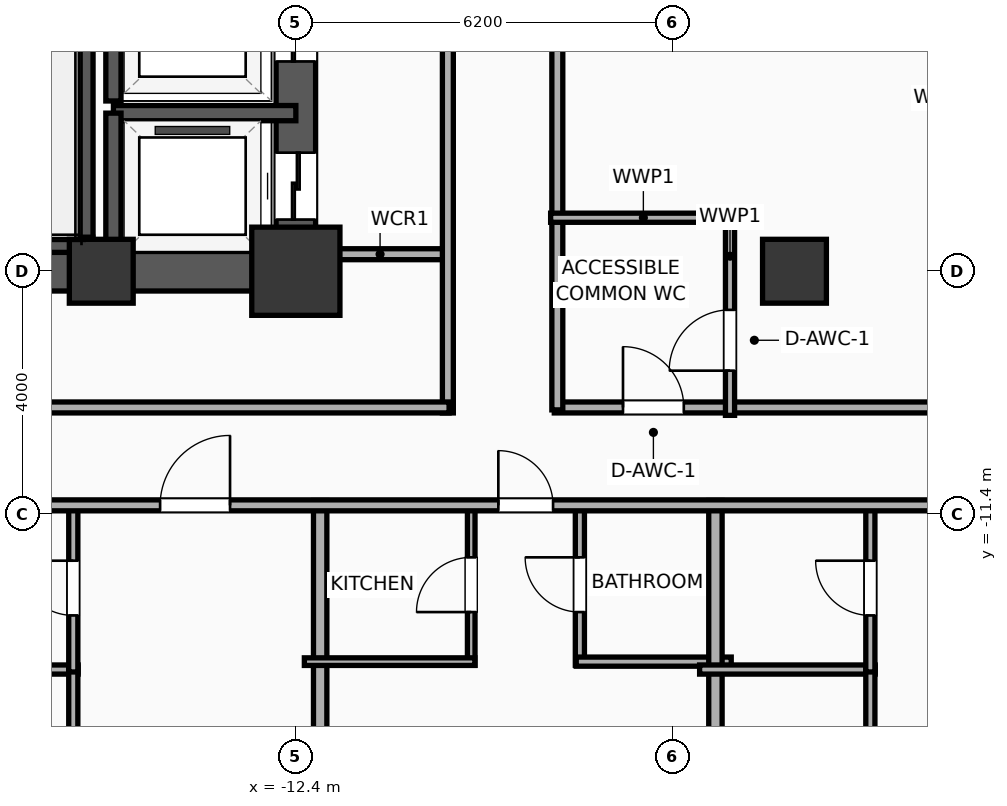
"""IFC4 building model, lengths in metres.
Left out: names, types, materials, properties, quantities, classifications, styles, units other than length and angle.
Written with IfcOpenShell. Run it as: python <this file> out.ifc"""

import sys

from ifc_helpers import new_model, si_unit, direction, frame, frame_2d, origin, origin_2d, place, context, subcontext, project, spatial, rectangle, extrude, element, fill, save


model = new_model("IFC4")
c1 = context("Model", 3, precision=1e-05, world=origin(), true_north=direction((0.0, 1.0)))
c2 = subcontext(c1, "Body", "Model", "MODEL_VIEW")
j1 = project(units=[si_unit("LENGTHUNIT", "METRE"), si_unit("PLANEANGLEUNIT", "RADIAN")], contexts=[c1])
p1 = place(None, origin())
s1 = spatial("IfcSite", under=j1, at=p1, CompositionType="ELEMENT")
p2 = place(p1, origin())
s2 = spatial("IfcBuilding", under=s1, at=p2, CompositionType="ELEMENT")
p3 = place(p2, frame((0.0, 0.0, 76.7)))
s3 = spatial("IfcBuildingStorey", under=s2, at=p3, CompositionType="ELEMENT", Elevation=76.7)
p4 = place(p3, frame((-15.6, -7.4, 0.0), z_axis=(0.0, 0.0, 1.0), x_axis=(1.0, 0.0, 0.0)))
e1 = element("IfcColumn", 1, at=p4, inside=s3, PredefinedType="COLUMN", context=c2, shape_type="SweptSolid", body=[
    extrude(rectangle(XDim=1.05, YDim=1.05, at=origin_2d()), origin(), (0.0, 0.0, 1.0), 3.9),
])
p5 = place(p3, frame((-12.4, -7.4, 0.0), z_axis=(0.0, 0.0, 1.0), x_axis=(1.0, 0.0, 0.0)))
e2 = element("IfcColumn", 2, at=p5, inside=s3, PredefinedType="COLUMN", context=c2, shape_type="SweptSolid", body=[
    extrude(rectangle(XDim=1.45, YDim=1.45, at=origin_2d()), origin(), (0.0, 0.0, 1.0), 3.9),
])
p6 = place(p3, frame((-19.525, -7.4, 0.0), z_axis=(0.0, 0.0, 1.0), x_axis=(1.0, 0.0, 0.0)))
e3 = element("IfcWall", 3, at=p6, inside=s3, PredefinedType="SHEAR", context=c2, shape_type="SweptSolid", body=[
    extrude(rectangle(XDim=7.45, YDim=0.65, at=frame_2d((3.725, 0.0))), origin(), (0.0, 0.0, 1.0), 3.6),
])
p7 = place(p3, frame((-12.4, -7.4, 0.0), z_axis=(0.0, 0.0, 1.0), x_axis=(0.0, 1.0, 0.0)))
e4 = element("IfcWall", 4, at=p7, inside=s3, PredefinedType="SHEAR", context=c2, shape_type="SweptSolid", body=[
    extrude(rectangle(XDim=14.8, YDim=0.65, at=frame_2d((7.4, 0.0))), origin(), (0.0, 0.0, 1.0), 3.6),
])
p8 = place(p7, frame((0.85, 0.0, 0.0)))
e5 = element("IfcOpeningElement", 5, at=p8, cuts=e4, PredefinedType="OPENING", context=c2, shape_type="SweptSolid", body=[
    extrude(rectangle(XDim=1.1, YDim=2.05, at=frame_2d((0.55, 1.025))), frame((0.0, 0.335, 0.0), z_axis=(0.0, -1.0, 0.0), x_axis=(1.0, 0.0, 0.0)), (0.0, 0.0, 1.0), 0.67),
])
p9 = place(p7, frame((3.45, 0.0, 0.0)))
e6 = element("IfcOpeningElement", 6, at=p9, cuts=e4, PredefinedType="OPENING", context=c2, shape_type="SweptSolid", body=[
    extrude(rectangle(XDim=1.1, YDim=2.05, at=frame_2d((0.55, 1.025))), frame((0.0, 0.335, 0.0), z_axis=(0.0, -1.0, 0.0), x_axis=(1.0, 0.0, 0.0)), (0.0, 0.0, 1.0), 0.67),
])
p10 = place(p7, frame((10.53, 0.0, 0.0)))
e7 = element("IfcOpeningElement", 7, at=p10, cuts=e4, PredefinedType="OPENING", context=c2, shape_type="SweptSolid", body=[
    extrude(rectangle(XDim=1.1, YDim=2.05, at=frame_2d((0.55, 1.025))), frame((0.0, 0.335, 0.0), z_axis=(0.0, -1.0, 0.0), x_axis=(1.0, 0.0, 0.0)), (0.0, 0.0, 1.0), 0.67),
])
p11 = place(p3, frame((-15.86, -7.085, 0.0), z_axis=(0.0, 0.0, 1.0), x_axis=(0.0, 1.0, 0.0)))
e8 = element("IfcWall", 8, at=p11, inside=s3, PredefinedType="SOLIDWALL", context=c2, shape_type="SweptSolid", body=[
    extrude(rectangle(XDim=7.685, YDim=0.25, at=frame_2d((3.843, 0.0))), origin(), (0.0, 0.0, 1.0), 3.6),
])
p12 = place(p3, frame((-19.2, -6.965, 0.0), z_axis=(0.0, 0.0, 1.0), x_axis=(1.0, 0.0, 0.0)))
e9 = element("IfcWall", 9, at=p12, inside=s3, PredefinedType="SOLIDWALL", context=c2, shape_type="SweptSolid", body=[
    extrude(rectangle(XDim=3.46, YDim=0.25, at=frame_2d((1.73, 0.0))), origin(), (0.0, 0.0, 1.0), 3.6),
])
p13 = place(p3, frame((-4.2, -7.4, 0.0), z_axis=(0.0, 0.0, 1.0), x_axis=(1.0, 0.0, 0.0)))
e10 = element("IfcColumn", 10, at=p13, inside=s3, PredefinedType="COLUMN", context=c2, shape_type="SweptSolid", body=[
    extrude(rectangle(XDim=1.05, YDim=1.05, at=origin_2d()), origin(), (0.0, 0.0, 1.0), 3.9),
])
p14 = place(p3, frame((-12.4, -4.8, 0.0), z_axis=(0.0, 0.0, 1.0), x_axis=(-1.0, 0.0, 0.0)))
e11 = element("IfcWall", 11, at=p14, inside=s3, PredefinedType="SOLIDWALL", context=c2, shape_type="SweptSolid", body=[
    extrude(rectangle(XDim=3.0, YDim=0.25, at=frame_2d((1.5, 0.0))), origin(), (0.0, 0.0, 1.0), 3.6),
])
p15 = place(p3, frame((-15.4, -4.8, 0.0), z_axis=(0.0, 0.0, 1.0), x_axis=(0.0, -1.0, 0.0)))
e12 = element("IfcWall", 12, at=p15, inside=s3, PredefinedType="SOLIDWALL", context=c2, shape_type="SweptSolid", body=[
    extrude(rectangle(XDim=2.6, YDim=0.25, at=frame_2d((1.3, 0.0))), origin(), (0.0, 0.0, 1.0), 3.6),
])
p16 = place(p3, frame((-15.4, -2.2, 0.0), z_axis=(0.0, 0.0, 1.0), x_axis=(0.0, -1.0, 0.0)))
e13 = element("IfcWall", 13, at=p16, inside=s3, PredefinedType="SOLIDWALL", context=c2, shape_type="SweptSolid", body=[
    extrude(rectangle(XDim=2.4, YDim=0.25, at=frame_2d((1.2, 0.0))), origin(), (0.0, 0.0, 1.0), 3.6),
])
p17 = place(p3, frame((-12.15, -7.12, 0.0), z_axis=(0.0, 0.0, 1.0), x_axis=(1.0, 0.0, 0.0)))
e14 = element("IfcWall", 14, at=p17, inside=s3, PredefinedType="PARTITIONING", context=c2, shape_type="SweptSolid", body=[
    extrude(rectangle(XDim=2.27, YDim=0.18, at=frame_2d((1.135, 0.0))), origin(), (0.0, 0.0, 1.0), 2.89),
])
p18 = place(p3, frame((-9.9, -9.73, 0.0), z_axis=(0.0, 0.0, 1.0), x_axis=(0.0, 1.0, 0.0)))
e15 = element("IfcWall", 15, at=p18, inside=s3, PredefinedType="PARTITIONING", context=c2, shape_type="SweptSolid", body=[
    extrude(rectangle(XDim=19.46, YDim=0.18, at=frame_2d((9.73, 0.0))), origin(), (0.0, 0.0, 1.0), 3.6),
])
p19 = place(p18, frame((8.207, 0.0, 0.0)))
e16 = element("IfcOpeningElement", 16, at=p19, cuts=e15, PredefinedType="OPENING", context=c2, shape_type="SweptSolid", body=[
    extrude(rectangle(XDim=1.1, YDim=2.05, at=frame_2d((0.55, 1.025))), frame((0.0, 0.1, 0.0), z_axis=(0.0, -1.0, 0.0), x_axis=(1.0, 0.0, 0.0)), (0.0, 0.0, 1.0), 0.2),
])
p20 = place(p3, frame((-33.41, -9.64, 0.0), z_axis=(0.0, 0.0, 1.0), x_axis=(1.0, 0.0, 0.0)))
e17 = element("IfcWall", 17, at=p20, inside=s3, PredefinedType="PARTITIONING", context=c2, shape_type="SweptSolid", body=[
    extrude(rectangle(XDim=23.53, YDim=0.18, at=frame_2d((11.765, 0.0))), origin(), (0.0, 0.0, 1.0), 3.6),
])
p21 = place(p3, frame((-8.15, -9.64, 0.0), z_axis=(0.0, 0.0, 1.0), x_axis=(1.0, 0.0, 0.0)))
e18 = element("IfcWall", 18, at=p21, inside=s3, PredefinedType="PARTITIONING", context=c2, shape_type="SweptSolid", body=[
    extrude(rectangle(XDim=16.3, YDim=0.18, at=frame_2d((8.15, 0.0))), origin(), (0.0, 0.0, 1.0), 3.6),
])
p22 = place(p21, frame((1.13, 0.0, 0.0)))
e19 = element("IfcOpeningElement", 19, at=p22, cuts=e18, PredefinedType="OPENING", context=c2, shape_type="SweptSolid", body=[
    extrude(rectangle(XDim=1.0, YDim=2.05, at=frame_2d((0.5, 1.025))), frame((0.0, 0.1, 0.0), z_axis=(0.0, -1.0, 0.0), x_axis=(1.0, 0.0, 0.0)), (0.0, 0.0, 1.0), 0.2),
])
p23 = place(p21, frame((10.12, 0.0, 0.0)))
e20 = element("IfcOpeningElement", 20, at=p23, cuts=e18, PredefinedType="OPENING", context=c2, shape_type="SweptSolid", body=[
    extrude(rectangle(XDim=0.95, YDim=2.05, at=frame_2d((0.475, 1.025))), frame((0.0, 0.1, 0.0), z_axis=(0.0, -1.0, 0.0), x_axis=(1.0, 0.0, 0.0)), (0.0, 0.0, 1.0), 0.2),
])
p24 = place(p3, frame((-8.1, -9.68, 0.0), z_axis=(0.0, 0.0, 1.0), x_axis=(0.0, 1.0, 0.0)))
e21 = element("IfcWall", 21, at=p24, inside=s3, PredefinedType="PARTITIONING", context=c2, shape_type="SweptSolid", body=[
    extrude(rectangle(XDim=19.36, YDim=0.18, at=frame_2d((9.68, 0.0))), origin(), (0.0, 0.0, 1.0), 3.6),
])
p25 = place(p3, frame((-5.26, -9.77, 0.0), z_axis=(0.0, 0.0, 1.0), x_axis=(0.0, 1.0, 0.0)))
e22 = element("IfcWall", 22, at=p25, inside=s3, PredefinedType="PLUMBINGWALL", context=c2, shape_type="SweptSolid", body=[
    extrude(rectangle(XDim=3.35, YDim=0.15, at=frame_2d((1.675, 0.0))), origin(), (0.0, 0.0, 1.0), 3.6),
])
p26 = place(p25, frame((0.735, 0.0, 0.0)))
e23 = element("IfcOpeningElement", 23, at=p26, cuts=e22, PredefinedType="OPENING", context=c2, shape_type="SweptSolid", body=[
    extrude(rectangle(XDim=1.0, YDim=2.05, at=frame_2d((0.5, 1.025))), frame((0.0, 0.085, 0.0), z_axis=(0.0, -1.0, 0.0), x_axis=(1.0, 0.0, 0.0)), (0.0, 0.0, 1.0), 0.17),
])
p27 = place(p3, frame((-8.21, -6.52, 0.0), z_axis=(0.0, 0.0, 1.0), x_axis=(1.0, 0.0, 0.0)))
e24 = element("IfcWall", 24, at=p27, inside=s3, PredefinedType="PLUMBINGWALL", context=c2, shape_type="SweptSolid", body=[
    extrude(rectangle(XDim=3.05, YDim=0.15, at=frame_2d((1.525, 0.0))), origin(), (0.0, 0.0, 1.0), 3.6),
])
p28 = place(p3, frame((-18.76, -13.95, 0.0), z_axis=(0.0, 0.0, 1.0), x_axis=(1.0, 0.0, 0.0)))
e25 = element("IfcWall", 25, at=p28, inside=s3, PredefinedType="PLUMBINGWALL", context=c2, shape_type="SweptSolid", body=[
    extrude(rectangle(XDim=2.78, YDim=0.15, at=frame_2d((1.39, 0.0))), origin(), (0.0, 0.0, 1.0), 3.6),
])
p29 = place(p3, frame((-16.06, -22.258, 0.0), z_axis=(0.0, 0.0, 1.0), x_axis=(0.0, 1.0, 0.0)))
e26 = element("IfcWall", 26, at=p29, inside=s3, PredefinedType="PLUMBINGWALL", context=c2, shape_type="SweptSolid", body=[
    extrude(rectangle(XDim=8.348, YDim=0.15, at=frame_2d((4.174, 0.0))), origin(), (0.0, 0.0, 1.0), 3.6),
])
p30 = place(p29, frame((6.395, 0.0, 0.0)))
e27 = element("IfcOpeningElement", 27, at=p30, cuts=e26, PredefinedType="OPENING", context=c2, shape_type="SweptSolid", body=[
    extrude(rectangle(XDim=0.9, YDim=2.05, at=frame_2d((0.45, 1.025))), frame((0.0, 0.085, 0.0), z_axis=(0.0, -1.0, 0.0), x_axis=(1.0, 0.0, 0.0)), (0.0, 0.0, 1.0), 0.17),
])
p31 = place(p3, frame((-16.06, -13.99, 0.0), z_axis=(0.0, 0.0, 1.0), x_axis=(0.0, 1.0, 0.0)))
e28 = element("IfcWall", 28, at=p31, inside=s3, PredefinedType="PLUMBINGWALL", context=c2, shape_type="SweptSolid", body=[
    extrude(rectangle(XDim=2.76, YDim=0.15, at=frame_2d((1.38, 0.0))), origin(), (0.0, 0.0, 1.0), 3.6),
])
p32 = place(p31, frame((0.93, 0.0, 0.0)))
e29 = element("IfcOpeningElement", 29, at=p32, cuts=e28, PredefinedType="OPENING", context=c2, shape_type="SweptSolid", body=[
    extrude(rectangle(XDim=0.9, YDim=2.05, at=frame_2d((0.45, 1.025))), frame((0.0, 0.085, 0.0), z_axis=(0.0, -1.0, 0.0), x_axis=(1.0, 0.0, 0.0)), (0.0, 0.0, 1.0), 0.17),
])
p33 = place(p3, frame((-12.0, -22.21, 0.0), z_axis=(0.0, 0.0, 1.0), x_axis=(0.0, 1.0, 0.0)))
e30 = element("IfcWall", 30, at=p33, inside=s3, PredefinedType="PARTITIONING", context=c2, shape_type="SweptSolid", body=[
    extrude(rectangle(XDim=11.04, YDim=0.22, at=frame_2d((5.52, 0.0))), origin(), (0.0, 0.0, 1.0), 3.6),
])
p34 = place(p3, frame((-9.516, -13.88, 0.0), z_axis=(0.0, 0.0, 1.0), x_axis=(0.0, 1.0, 0.0)))
e31 = element("IfcWall", 31, at=p34, inside=s3, PredefinedType="PARTITIONING", context=c2, shape_type="SweptSolid", body=[
    extrude(rectangle(XDim=2.65, YDim=0.125, at=frame_2d((1.325, 0.0))), origin(), (0.0, 0.0, 1.0), 3.6),
])
p35 = place(p34, frame((0.875, 0.0, 0.0)))
e32 = element("IfcOpeningElement", 32, at=p35, cuts=e31, PredefinedType="OPENING", context=c2, shape_type="SweptSolid", body=[
    extrude(rectangle(XDim=0.9, YDim=2.05, at=frame_2d((0.45, 1.025))), frame((0.0, 0.073, 0.0), z_axis=(0.0, -1.0, 0.0), x_axis=(1.0, 0.0, 0.0)), (0.0, 0.0, 1.0), 0.145),
])
p36 = place(p3, frame((-7.729, -13.88, 0.0), z_axis=(0.0, 0.0, 1.0), x_axis=(0.0, 1.0, 0.0)))
e33 = element("IfcWall", 33, at=p36, inside=s3, PredefinedType="PLUMBINGWALL", context=c2, shape_type="SweptSolid", body=[
    extrude(rectangle(XDim=2.65, YDim=0.15, at=frame_2d((1.325, 0.0))), origin(), (0.0, 0.0, 1.0), 3.6),
])
p37 = place(p36, frame((0.875, 0.0, 0.0)))
e34 = element("IfcOpeningElement", 34, at=p37, cuts=e33, PredefinedType="OPENING", context=c2, shape_type="SweptSolid", body=[
    extrude(rectangle(XDim=0.9, YDim=2.05, at=frame_2d((0.45, 1.025))), frame((0.0, 0.085, 0.0), z_axis=(0.0, -1.0, 0.0), x_axis=(1.0, 0.0, 0.0)), (0.0, 0.0, 1.0), 0.17),
])
p38 = place(p3, frame((-12.26, -13.82, 0.0), z_axis=(0.0, 0.0, 1.0), x_axis=(1.0, 0.0, 0.0)))
e35 = element("IfcWall", 35, at=p38, inside=s3, PredefinedType="PARTITIONING", context=c2, shape_type="SweptSolid", body=[
    extrude(rectangle(XDim=2.804, YDim=0.125, at=frame_2d((1.402, 0.0))), origin(), (0.0, 0.0, 1.0), 3.6),
])
p39 = place(p3, frame((-7.789, -13.82, 0.0), z_axis=(0.0, 0.0, 1.0), x_axis=(1.0, 0.0, 0.0)))
e36 = element("IfcWall", 36, at=p39, inside=s3, PredefinedType="PLUMBINGWALL", context=c2, shape_type="SweptSolid", body=[
    extrude(rectangle(XDim=2.549, YDim=0.15, at=frame_2d((1.274, 0.0))), origin(), (0.0, 0.0, 1.0), 3.6),
])
p40 = place(p3, frame((-5.5, -22.21, 0.0), z_axis=(0.0, 0.0, 1.0), x_axis=(0.0, 1.0, 0.0)))
e37 = element("IfcWall", 37, at=p40, inside=s3, PredefinedType="PARTITIONING", context=c2, shape_type="SweptSolid", body=[
    extrude(rectangle(XDim=11.04, YDim=0.22, at=frame_2d((5.52, 0.0))), origin(), (0.0, 0.0, 1.0), 3.6),
])
p41 = place(p3, frame((-5.76, -13.95, 0.0), z_axis=(0.0, 0.0, 1.0), x_axis=(1.0, 0.0, 0.0)))
e38 = element("IfcWall", 38, at=p41, inside=s3, PredefinedType="PLUMBINGWALL", context=c2, shape_type="SweptSolid", body=[
    extrude(rectangle(XDim=2.888, YDim=0.15, at=frame_2d((1.444, 0.0))), origin(), (0.0, 0.0, 1.0), 3.6),
])
p42 = place(p3, frame((-2.952, -22.258, 0.0), z_axis=(0.0, 0.0, 1.0), x_axis=(0.0, 1.0, 0.0)))
e39 = element("IfcWall", 39, at=p42, inside=s3, PredefinedType="PLUMBINGWALL", context=c2, shape_type="SweptSolid", body=[
    extrude(rectangle(XDim=8.348, YDim=0.15, at=frame_2d((4.174, 0.0))), origin(), (0.0, 0.0, 1.0), 3.6),
])
p43 = place(p42, frame((6.395, 0.0, 0.0)))
e40 = element("IfcOpeningElement", 40, at=p43, cuts=e39, PredefinedType="OPENING", context=c2, shape_type="SweptSolid", body=[
    extrude(rectangle(XDim=0.9, YDim=2.05, at=frame_2d((0.45, 1.025))), frame((0.0, 0.085, 0.0), z_axis=(0.0, -1.0, 0.0), x_axis=(1.0, 0.0, 0.0)), (0.0, 0.0, 1.0), 0.17),
])
p44 = place(p3, frame((-2.952, -13.99, 0.0), z_axis=(0.0, 0.0, 1.0), x_axis=(0.0, 1.0, 0.0)))
e41 = element("IfcWall", 41, at=p44, inside=s3, PredefinedType="PLUMBINGWALL", context=c2, shape_type="SweptSolid", body=[
    extrude(rectangle(XDim=2.76, YDim=0.15, at=frame_2d((1.38, 0.0))), origin(), (0.0, 0.0, 1.0), 3.6),
])
p45 = place(p44, frame((0.93, 0.0, 0.0)))
e42 = element("IfcOpeningElement", 42, at=p45, cuts=e41, PredefinedType="OPENING", context=c2, shape_type="SweptSolid", body=[
    extrude(rectangle(XDim=0.9, YDim=2.05, at=frame_2d((0.45, 1.025))), frame((0.0, 0.085, 0.0), z_axis=(0.0, -1.0, 0.0), x_axis=(1.0, 0.0, 0.0)), (0.0, 0.0, 1.0), 0.17),
])
p46 = place(p3, frame((-33.41, -11.25, 0.0), z_axis=(0.0, 0.0, 1.0), x_axis=(1.0, 0.0, 0.0)))
e43 = element("IfcWall", 43, at=p46, inside=s3, PredefinedType="PARTITIONING", context=c2, shape_type="SweptSolid", body=[
    extrude(rectangle(XDim=59.62, YDim=0.18, at=frame_2d((29.81, 0.0))), origin(), (0.0, 0.0, 1.0), 3.6),
])
p47 = place(p46, frame((3.282, 0.0, 0.0)))
e44 = element("IfcOpeningElement", 44, at=p47, cuts=e43, PredefinedType="OPENING", context=c2, shape_type="SweptSolid", body=[
    extrude(rectangle(XDim=1.15, YDim=2.05, at=frame_2d((0.575, 1.025))), frame((0.0, 0.1, 0.0), z_axis=(0.0, -1.0, 0.0), x_axis=(1.0, 0.0, 0.0)), (0.0, 0.0, 1.0), 0.2),
])
p48 = place(p46, frame((10.771, 0.0, 0.0)))
e45 = element("IfcOpeningElement", 45, at=p48, cuts=e43, PredefinedType="OPENING", context=c2, shape_type="SweptSolid", body=[
    extrude(rectangle(XDim=1.15, YDim=2.05, at=frame_2d((0.575, 1.025))), frame((0.0, 0.1, 0.0), z_axis=(0.0, -1.0, 0.0), x_axis=(1.0, 0.0, 0.0)), (0.0, 0.0, 1.0), 0.2),
])
p49 = place(p46, frame((18.778, 0.0, 0.0)))
e46 = element("IfcOpeningElement", 46, at=p49, cuts=e43, PredefinedType="OPENING", context=c2, shape_type="SweptSolid", body=[
    extrude(rectangle(XDim=1.15, YDim=2.05, at=frame_2d((0.575, 1.025))), frame((0.0, 0.1, 0.0), z_axis=(0.0, -1.0, 0.0), x_axis=(1.0, 0.0, 0.0)), (0.0, 0.0, 1.0), 0.2),
])
p50 = place(p46, frame((24.34, 0.0, 0.0)))
e47 = element("IfcOpeningElement", 47, at=p50, cuts=e43, PredefinedType="OPENING", context=c2, shape_type="SweptSolid", body=[
    extrude(rectangle(XDim=0.9, YDim=2.05, at=frame_2d((0.45, 1.025))), frame((0.0, 0.1, 0.0), z_axis=(0.0, -1.0, 0.0), x_axis=(1.0, 0.0, 0.0)), (0.0, 0.0, 1.0), 0.2),
])
p51 = place(p46, frame((31.829, 0.0, 0.0)))
e48 = element("IfcOpeningElement", 48, at=p51, cuts=e43, PredefinedType="OPENING", context=c2, shape_type="SweptSolid", body=[
    extrude(rectangle(XDim=1.15, YDim=2.05, at=frame_2d((0.575, 1.025))), frame((0.0, 0.1, 0.0), z_axis=(0.0, -1.0, 0.0), x_axis=(1.0, 0.0, 0.0)), (0.0, 0.0, 1.0), 0.2),
])
p52 = place(p46, frame((35.948, 0.0, 0.0)))
e49 = element("IfcOpeningElement", 49, at=p52, cuts=e43, PredefinedType="OPENING", context=c2, shape_type="SweptSolid", body=[
    extrude(rectangle(XDim=1.15, YDim=2.05, at=frame_2d((0.575, 1.025))), frame((0.0, 0.1, 0.0), z_axis=(0.0, -1.0, 0.0), x_axis=(1.0, 0.0, 0.0)), (0.0, 0.0, 1.0), 0.2),
])
p53 = place(p46, frame((43.705, 0.0, 0.0)))
e50 = element("IfcOpeningElement", 50, at=p53, cuts=e43, PredefinedType="OPENING", context=c2, shape_type="SweptSolid", body=[
    extrude(rectangle(XDim=0.9, YDim=2.05, at=frame_2d((0.45, 1.025))), frame((0.0, 0.1, 0.0), z_axis=(0.0, -1.0, 0.0), x_axis=(1.0, 0.0, 0.0)), (0.0, 0.0, 1.0), 0.2),
])
p54 = place(p46, frame((48.552, 0.0, 0.0)))
e51 = element("IfcOpeningElement", 51, at=p54, cuts=e43, PredefinedType="OPENING", context=c2, shape_type="SweptSolid", body=[
    extrude(rectangle(XDim=1.15, YDim=2.05, at=frame_2d((0.575, 1.025))), frame((0.0, 0.1, 0.0), z_axis=(0.0, -1.0, 0.0), x_axis=(1.0, 0.0, 0.0)), (0.0, 0.0, 1.0), 0.2),
])
p55 = place(p46, frame((56.213, 0.0, 0.0)))
e52 = element("IfcOpeningElement", 52, at=p55, cuts=e43, PredefinedType="OPENING", context=c2, shape_type="SweptSolid", body=[
    extrude(rectangle(XDim=0.9, YDim=2.05, at=frame_2d((0.45, 1.025))), frame((0.0, 0.1, 0.0), z_axis=(0.0, -1.0, 0.0), x_axis=(1.0, 0.0, 0.0)), (0.0, 0.0, 1.0), 0.2),
])
p56 = place(p8, origin())
e53 = element("IfcDoor", 53, at=p56, inside=s3, OperationType="SLIDING_TO_LEFT", PredefinedType="DOOR", context=c2, shape_type="SweptSolid", body=[
    extrude(rectangle(XDim=1.1, YDim=2.05, at=frame_2d((0.55, 1.025))), frame((0.0, 0.025, 0.0), z_axis=(0.0, -1.0, 0.0), x_axis=(1.0, 0.0, 0.0)), (0.0, 0.0, 1.0), 0.05),
])
fill(e5, e53)
p57 = place(p9, origin())
e54 = element("IfcDoor", 54, at=p57, inside=s3, OperationType="SLIDING_TO_LEFT", PredefinedType="DOOR", context=c2, shape_type="SweptSolid", body=[
    extrude(rectangle(XDim=1.1, YDim=2.05, at=frame_2d((0.55, 1.025))), frame((0.0, 0.025, 0.0), z_axis=(0.0, -1.0, 0.0), x_axis=(1.0, 0.0, 0.0)), (0.0, 0.0, 1.0), 0.05),
])
fill(e6, e54)
p58 = place(p22, origin())
e55 = element("IfcDoor", 55, at=p58, inside=s3, OperationType="SINGLE_SWING_LEFT", PredefinedType="DOOR", context=c2, shape_type="SweptSolid", body=[
    extrude(rectangle(XDim=1.0, YDim=2.05, at=frame_2d((0.5, 1.025))), frame((0.0, 0.025, 0.0), z_axis=(0.0, -1.0, 0.0), x_axis=(1.0, 0.0, 0.0)), (0.0, 0.0, 1.0), 0.05),
])
fill(e19, e55)
p59 = place(p26, origin())
e56 = element("IfcDoor", 56, at=p59, inside=s3, OperationType="SINGLE_SWING_LEFT", PredefinedType="DOOR", context=c2, shape_type="SweptSolid", body=[
    extrude(rectangle(XDim=1.0, YDim=2.05, at=frame_2d((0.5, 1.025))), frame((0.0, 0.025, 0.0), z_axis=(0.0, -1.0, 0.0), x_axis=(1.0, 0.0, 0.0)), (0.0, 0.0, 1.0), 0.05),
])
fill(e23, e56)
p60 = place(p32, origin())
e57 = element("IfcDoor", 57, at=p60, inside=s3, OperationType="SINGLE_SWING_RIGHT", PredefinedType="DOOR", context=c2, shape_type="SweptSolid", body=[
    extrude(rectangle(XDim=0.9, YDim=2.05, at=frame_2d((0.45, 1.025))), frame((0.0, 0.025, 0.0), z_axis=(0.0, -1.0, 0.0), x_axis=(1.0, 0.0, 0.0)), (0.0, 0.0, 1.0), 0.05),
])
fill(e29, e57)
p61 = place(p35, origin())
e58 = element("IfcDoor", 58, at=p61, inside=s3, OperationType="SINGLE_SWING_LEFT", PredefinedType="DOOR", context=c2, shape_type="SweptSolid", body=[
    extrude(rectangle(XDim=0.9, YDim=2.05, at=frame_2d((0.45, 1.025))), frame((0.0, 0.025, 0.0), z_axis=(0.0, -1.0, 0.0), x_axis=(1.0, 0.0, 0.0)), (0.0, 0.0, 1.0), 0.05),
])
fill(e32, e58)
p62 = place(p37, origin())
e59 = element("IfcDoor", 59, at=p62, inside=s3, OperationType="SINGLE_SWING_RIGHT", PredefinedType="DOOR", context=c2, shape_type="SweptSolid", body=[
    extrude(rectangle(XDim=0.9, YDim=2.05, at=frame_2d((0.45, 1.025))), frame((0.0, 0.025, 0.0), z_axis=(0.0, -1.0, 0.0), x_axis=(1.0, 0.0, 0.0)), (0.0, 0.0, 1.0), 0.05),
])
fill(e34, e59)
p63 = place(p45, origin())
e60 = element("IfcDoor", 60, at=p63, inside=s3, OperationType="SINGLE_SWING_RIGHT", PredefinedType="DOOR", context=c2, shape_type="SweptSolid", body=[
    extrude(rectangle(XDim=0.9, YDim=2.05, at=frame_2d((0.45, 1.025))), frame((0.0, 0.025, 0.0), z_axis=(0.0, -1.0, 0.0), x_axis=(1.0, 0.0, 0.0)), (0.0, 0.0, 1.0), 0.05),
])
fill(e42, e60)
p64 = place(p49, origin())
e61 = element("IfcDoor", 61, at=p64, inside=s3, OperationType="SINGLE_SWING_RIGHT", PredefinedType="DOOR", context=c2, shape_type="SweptSolid", body=[
    extrude(rectangle(XDim=1.15, YDim=2.05, at=frame_2d((0.575, 1.025))), frame((0.0, 0.025, 0.0), z_axis=(0.0, -1.0, 0.0), x_axis=(1.0, 0.0, 0.0)), (0.0, 0.0, 1.0), 0.05),
])
fill(e46, e61)
p65 = place(p50, origin())
e62 = element("IfcDoor", 62, at=p65, inside=s3, OperationType="SINGLE_SWING_LEFT", PredefinedType="DOOR", context=c2, shape_type="SweptSolid", body=[
    extrude(rectangle(XDim=0.9, YDim=2.05, at=frame_2d((0.45, 1.025))), frame((0.0, 0.025, 0.0), z_axis=(0.0, -1.0, 0.0), x_axis=(1.0, 0.0, 0.0)), (0.0, 0.0, 1.0), 0.05),
])
fill(e47, e62)
save(model, sys.argv[1])
